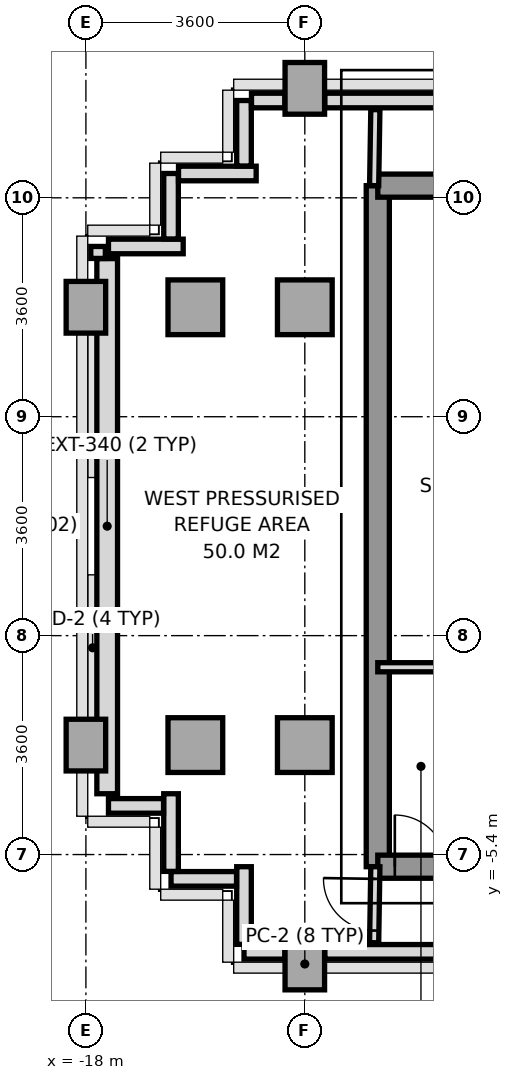
"""IFC4 building model, lengths in metres.
Left out: names, types, materials, properties, quantities, classifications, styles, units other than length and angle.
Written with IfcOpenShell. Run it as: python <this file> out.ifc"""

import sys

from ifc_helpers import new_model, si_unit, direction, frame, frame_2d, origin, origin_2d, place, context, subcontext, project, spatial, rectangle, extrude, source, transform, mapped, element, fill, save


model = new_model("IFC4")
c1 = context("Model", 3, precision=1e-05, world=origin(), true_north=direction((0.0, 1.0)))
c2 = subcontext(c1, "Body", "Model", "MODEL_VIEW")
j1 = project(units=[si_unit("LENGTHUNIT", "METRE"), si_unit("PLANEANGLEUNIT", "RADIAN")], contexts=[c1])
p1 = place(None, origin())
s1 = spatial("IfcSite", under=j1, at=p1, CompositionType="ELEMENT")
p2 = place(p1, origin())
s2 = spatial("IfcBuilding", under=s1, at=p2, CompositionType="ELEMENT")
p3 = place(p2, frame((0.0, 0.0, 214.8)))
s3 = spatial("IfcBuildingStorey", under=s2, at=p3, CompositionType="ELEMENT", Elevation=214.8)
m1 = source(origin(), c2, "Body", "SweptSolid", [
    extrude(rectangle(XDim=0.65, YDim=0.85, at=origin_2d()), origin(), (0.0, 0.0, 1.0), 4.41),
])
for number, where, z_axis, x_axis in (
    (1, (-18.0, -3.6, 0.0), (0.0, 0.0, 1.0), (1.0, 0.0, 0.0)),
    (2, (-18.0, 3.6, 0.0), (0.0, 0.0, 1.0), (1.0, 0.0, 0.0)),
):
    element("IfcColumn", number, at=place(p3, frame(where, z_axis=z_axis, x_axis=x_axis)), inside=s3, PredefinedType="COLUMN", context=c2, shape_type="MappedRepresentation", body=[
        mapped(m1, transform((0.0, 0.0, 0.0), x_axis=(1.0, 0.0, 0.0), y_axis=(0.0, 1.0, 0.0), z_axis=(0.0, 0.0, 1.0), scale=1.0)),
    ])
m2 = source(origin(), c2, "Body", "SweptSolid", [
    extrude(rectangle(XDim=0.9, YDim=0.9, at=origin_2d()), origin(), (0.0, 0.0, 1.0), 4.41),
])
for number, where, z_axis, x_axis in (
    (3, (-16.2, -3.6, 0.0), (0.0, 0.0, 1.0), (1.0, 0.0, 0.0)),
    (4, (-16.2, 3.6, 0.0), (0.0, 0.0, 1.0), (1.0, 0.0, 0.0)),
):
    element("IfcColumn", number, at=place(p3, frame(where, z_axis=z_axis, x_axis=x_axis)), inside=s3, PredefinedType="COLUMN", context=c2, shape_type="MappedRepresentation", body=[
        mapped(m2, transform((0.0, 0.0, 0.0), x_axis=(1.0, 0.0, 0.0), y_axis=(0.0, 1.0, 0.0), z_axis=(0.0, 0.0, 1.0), scale=1.0)),
    ])
p4 = place(p3, frame((-14.4, -7.2, 0.0), z_axis=(0.0, 0.0, 1.0), x_axis=(1.0, 0.0, 0.0)))
e5 = element("IfcColumn", 5, at=p4, inside=s3, PredefinedType="COLUMN", context=c2, shape_type="MappedRepresentation", body=[
    mapped(m1, transform((0.0, 0.0, 0.0), x_axis=(1.0, 0.0, 0.0), y_axis=(0.0, 1.0, 0.0), z_axis=(0.0, 0.0, 1.0), scale=1.0)),
])
for number, where, z_axis, x_axis in (
    (6, (-14.4, -3.6, 0.0), (0.0, 0.0, 1.0), (1.0, 0.0, 0.0)),
    (7, (-14.4, 3.6, 0.0), (0.0, 0.0, 1.0), (1.0, 0.0, 0.0)),
):
    element("IfcColumn", number, at=place(p3, frame(where, z_axis=z_axis, x_axis=x_axis)), inside=s3, PredefinedType="COLUMN", context=c2, shape_type="MappedRepresentation", body=[
        mapped(m2, transform((0.0, 0.0, 0.0), x_axis=(1.0, 0.0, 0.0), y_axis=(0.0, 1.0, 0.0), z_axis=(0.0, 0.0, 1.0), scale=1.0)),
    ])
p5 = place(p3, frame((-14.4, 7.2, 0.0), z_axis=(0.0, 0.0, 1.0), x_axis=(1.0, 0.0, 0.0)))
e8 = element("IfcColumn", 8, at=p5, inside=s3, PredefinedType="COLUMN", context=c2, shape_type="MappedRepresentation", body=[
    mapped(m1, transform((0.0, 0.0, 0.0), x_axis=(1.0, 0.0, 0.0), y_axis=(0.0, 1.0, 0.0), z_axis=(0.0, 0.0, 1.0), scale=1.0)),
])
p6 = place(p3, frame((-17.65, -4.4, 0.0), z_axis=(0.0, 0.0, 1.0), x_axis=(0.0, 1.0, 0.0)))
e9 = element("IfcWall", 9, at=p6, inside=s3, PredefinedType="SOLIDWALL", context=c2, shape_type="SweptSolid", body=[
    extrude(rectangle(XDim=8.8, YDim=0.34, at=frame_2d((4.4, 0.0))), origin(), (0.0, 0.0, 1.0), 3.76),
])
p7 = place(p3, frame((-9.523, -7.0, 0.0), z_axis=(0.0, 0.0, 1.0), x_axis=(-1.0, 0.0, 0.0)))
e10 = element("IfcWall", 10, at=p7, inside=s3, PredefinedType="PARAPET", context=c2, shape_type="SweptSolid", body=[
    extrude(rectangle(XDim=4.549, YDim=0.24, at=frame_2d((2.274, 0.0))), origin(), (0.0, 0.0, 1.0), 1.15),
])
p8 = place(p3, frame((-14.728, -7.0, 0.0), z_axis=(0.0, 0.0, 1.0), x_axis=(-1.0, 0.0, 0.0)))
e11 = element("IfcWall", 11, at=p8, inside=s3, PredefinedType="PARAPET", context=c2, shape_type="SweptSolid", body=[
    extrude(rectangle(XDim=0.672, YDim=0.24, at=frame_2d((0.336, 0.0))), origin(), (0.0, 0.0, 1.0), 1.15),
])
p9 = place(p3, frame((-15.4, -6.877, 0.0), z_axis=(0.0, 0.0, 1.0), x_axis=(0.0, 1.0, 0.0)))
e12 = element("IfcWall", 12, at=p9, inside=s3, PredefinedType="PARAPET", context=c2, shape_type="SweptSolid", body=[
    extrude(rectangle(XDim=1.277, YDim=0.24, at=frame_2d((0.638, 0.0))), origin(), (0.0, 0.0, 1.0), 1.15),
])
p10 = place(p3, frame((-15.523, -5.8, 0.0), z_axis=(0.0, 0.0, 1.0), x_axis=(-1.0, 0.0, 0.0)))
e13 = element("IfcWall", 13, at=p10, inside=s3, PredefinedType="PARAPET", context=c2, shape_type="SweptSolid", body=[
    extrude(rectangle(XDim=1.077, YDim=0.24, at=frame_2d((0.539, 0.0))), origin(), (0.0, 0.0, 1.0), 1.15),
])
p11 = place(p3, frame((-16.6, -5.677, 0.0), z_axis=(0.0, 0.0, 1.0), x_axis=(0.0, 1.0, 0.0)))
e14 = element("IfcWall", 14, at=p11, inside=s3, PredefinedType="PARAPET", context=c2, shape_type="SweptSolid", body=[
    extrude(rectangle(XDim=1.277, YDim=0.24, at=frame_2d((0.639, 0.0))), origin(), (0.0, 0.0, 1.0), 1.15),
])
p12 = place(p3, frame((-16.723, -4.6, 0.0), z_axis=(0.0, 0.0, 1.0), x_axis=(-1.0, 0.0, 0.0)))
e15 = element("IfcWall", 15, at=p12, inside=s3, PredefinedType="PARAPET", context=c2, shape_type="SweptSolid", body=[
    extrude(rectangle(XDim=0.906, YDim=0.24, at=frame_2d((0.453, 0.0))), origin(), (0.0, 0.0, 1.0), 1.15),
])
p13 = place(p3, frame((-17.8, 4.403, 0.0), z_axis=(0.0, 0.0, 1.0), x_axis=(0.0, 1.0, 0.0)))
e16 = element("IfcWall", 16, at=p13, inside=s3, PredefinedType="PARAPET", context=c2, shape_type="SweptSolid", body=[
    extrude(rectangle(XDim=0.197, YDim=0.24, at=frame_2d((0.099, 0.0))), origin(), (0.0, 0.0, 1.0), 1.15),
])
p14 = place(p3, frame((-17.629, 4.6, 0.0), z_axis=(0.0, 0.0, 1.0), x_axis=(1.0, 0.0, 0.0)))
e17 = element("IfcWall", 17, at=p14, inside=s3, PredefinedType="PARAPET", context=c2, shape_type="SweptSolid", body=[
    extrude(rectangle(XDim=1.229, YDim=0.24, at=frame_2d((0.615, 0.0))), origin(), (0.0, 0.0, 1.0), 1.15),
])
p15 = place(p3, frame((-16.6, 4.723, 0.0), z_axis=(0.0, 0.0, 1.0), x_axis=(0.0, 1.0, 0.0)))
e18 = element("IfcWall", 18, at=p15, inside=s3, PredefinedType="PARAPET", context=c2, shape_type="SweptSolid", body=[
    extrude(rectangle(XDim=1.077, YDim=0.24, at=frame_2d((0.539, 0.0))), origin(), (0.0, 0.0, 1.0), 1.15),
])
p16 = place(p3, frame((-16.477, 5.8, 0.0), z_axis=(0.0, 0.0, 1.0), x_axis=(1.0, 0.0, 0.0)))
e19 = element("IfcWall", 19, at=p16, inside=s3, PredefinedType="PARAPET", context=c2, shape_type="SweptSolid", body=[
    extrude(rectangle(XDim=1.277, YDim=0.24, at=frame_2d((0.639, 0.0))), origin(), (0.0, 0.0, 1.0), 1.15),
])
p17 = place(p3, frame((-15.4, 5.923, 0.0), z_axis=(0.0, 0.0, 1.0), x_axis=(0.0, 1.0, 0.0)))
e20 = element("IfcWall", 20, at=p17, inside=s3, PredefinedType="PARAPET", context=c2, shape_type="SweptSolid", body=[
    extrude(rectangle(XDim=1.077, YDim=0.24, at=frame_2d((0.539, 0.0))), origin(), (0.0, 0.0, 1.0), 1.15),
])
p18 = place(p3, frame((-15.277, 7.0, 0.0), z_axis=(0.0, 0.0, 1.0), x_axis=(1.0, 0.0, 0.0)))
e21 = element("IfcWall", 21, at=p18, inside=s3, PredefinedType="PARAPET", context=c2, shape_type="SweptSolid", body=[
    extrude(rectangle(XDim=0.549, YDim=0.24, at=frame_2d((0.274, 0.0))), origin(), (0.0, 0.0, 1.0), 1.15),
])
p19 = place(p3, frame((-14.072, 7.0, 0.0), z_axis=(0.0, 0.0, 1.0), x_axis=(1.0, 0.0, 0.0)))
e22 = element("IfcWall", 22, at=p19, inside=s3, PredefinedType="PARAPET", context=c2, shape_type="SweptSolid", body=[
    extrude(rectangle(XDim=2.669, YDim=0.24, at=frame_2d((1.334, 0.0))), origin(), (0.0, 0.0, 1.0), 1.15),
])
p20 = place(p3, frame((-13.2, -5.6, 0.0), z_axis=(0.0, 0.0, 1.0), x_axis=(0.0, 1.0, 0.0)))
e23 = element("IfcWall", 23, at=p20, inside=s3, PredefinedType="SHEAR", context=c2, shape_type="SweptSolid", body=[
    extrude(rectangle(XDim=11.2, YDim=0.38, at=frame_2d((5.6, 0.0))), origin(), (0.0, 0.0, 1.0), 4.41),
])
p21 = place(p3, frame((-13.2, 5.6, 0.0), z_axis=(0.0, 0.0, 1.0), x_axis=(1.0, 0.0, 0.0)))
e24 = element("IfcWall", 24, at=p21, inside=s3, PredefinedType="SHEAR", context=c2, shape_type="SweptSolid", body=[
    extrude(rectangle(XDim=1.844, YDim=0.38, at=frame_2d((0.922, 0.0))), origin(), (0.0, 0.0, 1.0), 4.41),
])
p22 = place(p3, frame((-13.2, -5.6, 0.0), z_axis=(0.0, 0.0, 1.0), x_axis=(1.0, 0.0, 0.0)))
e25 = element("IfcWall", 25, at=p22, inside=s3, PredefinedType="SHEAR", context=c2, shape_type="SweptSolid", body=[
    extrude(rectangle(XDim=7.8, YDim=0.38, at=frame_2d((3.9, 0.0))), origin(), (0.0, 0.0, 1.0), 4.41),
])
p23 = place(p22, frame((0.28, 0.0, 0.0)))
e26 = element("IfcOpeningElement", 26, at=p23, cuts=e25, PredefinedType="OPENING", context=c2, shape_type="SweptSolid", body=[
    extrude(rectangle(XDim=0.85, YDim=2.1, at=frame_2d((0.425, 1.05))), frame((0.0, 0.2, 0.0), z_axis=(0.0, -1.0, 0.0), x_axis=(1.0, 0.0, 0.0)), (0.0, 0.0, 1.0), 0.4),
])
p24 = place(p22, frame((1.36, 0.0, 0.0)))
e27 = element("IfcOpeningElement", 27, at=p24, cuts=e25, PredefinedType="OPENING", context=c2, shape_type="SweptSolid", body=[
    extrude(rectangle(XDim=0.85, YDim=2.1, at=frame_2d((0.425, 1.05))), frame((0.0, 0.2, 0.0), z_axis=(0.0, -1.0, 0.0), x_axis=(1.0, 0.0, 0.0)), (0.0, 0.0, 1.0), 0.4),
])
p25 = place(p22, frame((2.85, 0.0, 0.0)))
e28 = element("IfcOpeningElement", 28, at=p25, cuts=e25, PredefinedType="OPENING", context=c2, shape_type="SweptSolid", body=[
    extrude(rectangle(XDim=0.85, YDim=2.1, at=frame_2d((0.425, 1.05))), frame((0.0, 0.2, 0.0), z_axis=(0.0, -1.0, 0.0), x_axis=(1.0, 0.0, 0.0)), (0.0, 0.0, 1.0), 0.4),
])
p26 = place(p22, frame((4.55, 0.0, 0.0)))
e29 = element("IfcOpeningElement", 29, at=p26, cuts=e25, PredefinedType="OPENING", context=c2, shape_type="SweptSolid", body=[
    extrude(rectangle(XDim=0.85, YDim=2.1, at=frame_2d((0.425, 1.05))), frame((0.0, 0.2, 0.0), z_axis=(0.0, -1.0, 0.0), x_axis=(1.0, 0.0, 0.0)), (0.0, 0.0, 1.0), 0.4),
])
p27 = place(p22, frame((6.25, 0.0, 0.0)))
e30 = element("IfcOpeningElement", 30, at=p27, cuts=e25, PredefinedType="OPENING", context=c2, shape_type="SweptSolid", body=[
    extrude(rectangle(XDim=0.85, YDim=2.1, at=frame_2d((0.425, 1.05))), frame((0.0, 0.2, 0.0), z_axis=(0.0, -1.0, 0.0), x_axis=(1.0, 0.0, 0.0)), (0.0, 0.0, 1.0), 0.4),
])
p28 = place(p3, frame((-13.2, -2.32, 0.0), z_axis=(0.0, 0.0, 1.0), x_axis=(1.0, 0.0, 0.0)))
e31 = element("IfcWall", 31, at=p28, inside=s3, PredefinedType="PARTITIONING", context=c2, shape_type="SweptSolid", body=[
    extrude(rectangle(XDim=2.18, YDim=0.15, at=frame_2d((1.09, 0.0))), origin(), (0.0, 0.0, 1.0), 4.41),
])
p29 = place(p3, frame((-13.26, -6.85, 0.0), z_axis=(0.0, 0.0, 1.0), x_axis=(0.016013571389, 0.999871774545, 0.0)))
e32 = element("IfcWall", 32, at=p29, inside=s3, PredefinedType="PARTITIONING", context=c2, shape_type="SweptSolid", body=[
    extrude(rectangle(XDim=1.25, YDim=0.15, at=frame_2d((0.625, 0.0))), origin(), (0.0, 0.0, 1.0), 4.41),
])
p30 = place(p29, frame((0.2, 0.0, 0.0)))
e33 = element("IfcOpeningElement", 33, at=p30, cuts=e32, PredefinedType="OPENING", context=c2, shape_type="SweptSolid", body=[
    extrude(rectangle(XDim=0.85, YDim=2.1, at=frame_2d((0.425, 1.05))), frame((0.0, 0.085, 0.0), z_axis=(0.0, -1.0, 0.0), x_axis=(1.0, 0.0, 0.0)), (0.0, 0.0, 1.0), 0.17),
])
p31 = place(p3, frame((-13.26, 5.6, 0.0), z_axis=(0.0, 0.0, 1.0), x_axis=(0.016013571389, 0.999871774545, 0.0)))
e34 = element("IfcWall", 34, at=p31, inside=s3, PredefinedType="PARTITIONING", context=c2, shape_type="SweptSolid", body=[
    extrude(rectangle(XDim=1.25, YDim=0.15, at=frame_2d((0.625, 0.0))), origin(), (0.0, 0.0, 1.0), 4.41),
])
m3 = source(origin(), c2, "Body", "SweptSolid", [
    extrude(rectangle(XDim=0.85, YDim=2.1, at=frame_2d((0.425, 1.05))), frame((0.0, 0.025, 0.0), z_axis=(0.0, -1.0, 0.0), x_axis=(1.0, 0.0, 0.0)), (0.0, 0.0, 1.0), 0.05),
])
p32 = place(p23, origin())
e35 = element("IfcDoor", 35, at=p32, inside=s3, OperationType="SINGLE_SWING_LEFT", PredefinedType="DOOR", context=c2, shape_type="MappedRepresentation", body=[
    mapped(m3, transform((0.0, 0.0, 0.0), x_axis=(1.0, 0.0, 0.0), y_axis=(0.0, 1.0, 0.0), z_axis=(0.0, 0.0, 1.0), scale=1.0)),
])
fill(e26, e35)
p33 = place(p30, origin())
e36 = element("IfcDoor", 36, at=p33, inside=s3, OperationType="SINGLE_SWING_RIGHT", PredefinedType="DOOR", context=c2, shape_type="MappedRepresentation", body=[
    mapped(m3, transform((0.0, 0.0, 0.0), x_axis=(1.0, 0.0, 0.0), y_axis=(0.0, 1.0, 0.0), z_axis=(0.0, 0.0, 1.0), scale=1.0)),
])
fill(e33, e36)
save(model, sys.argv[1])
